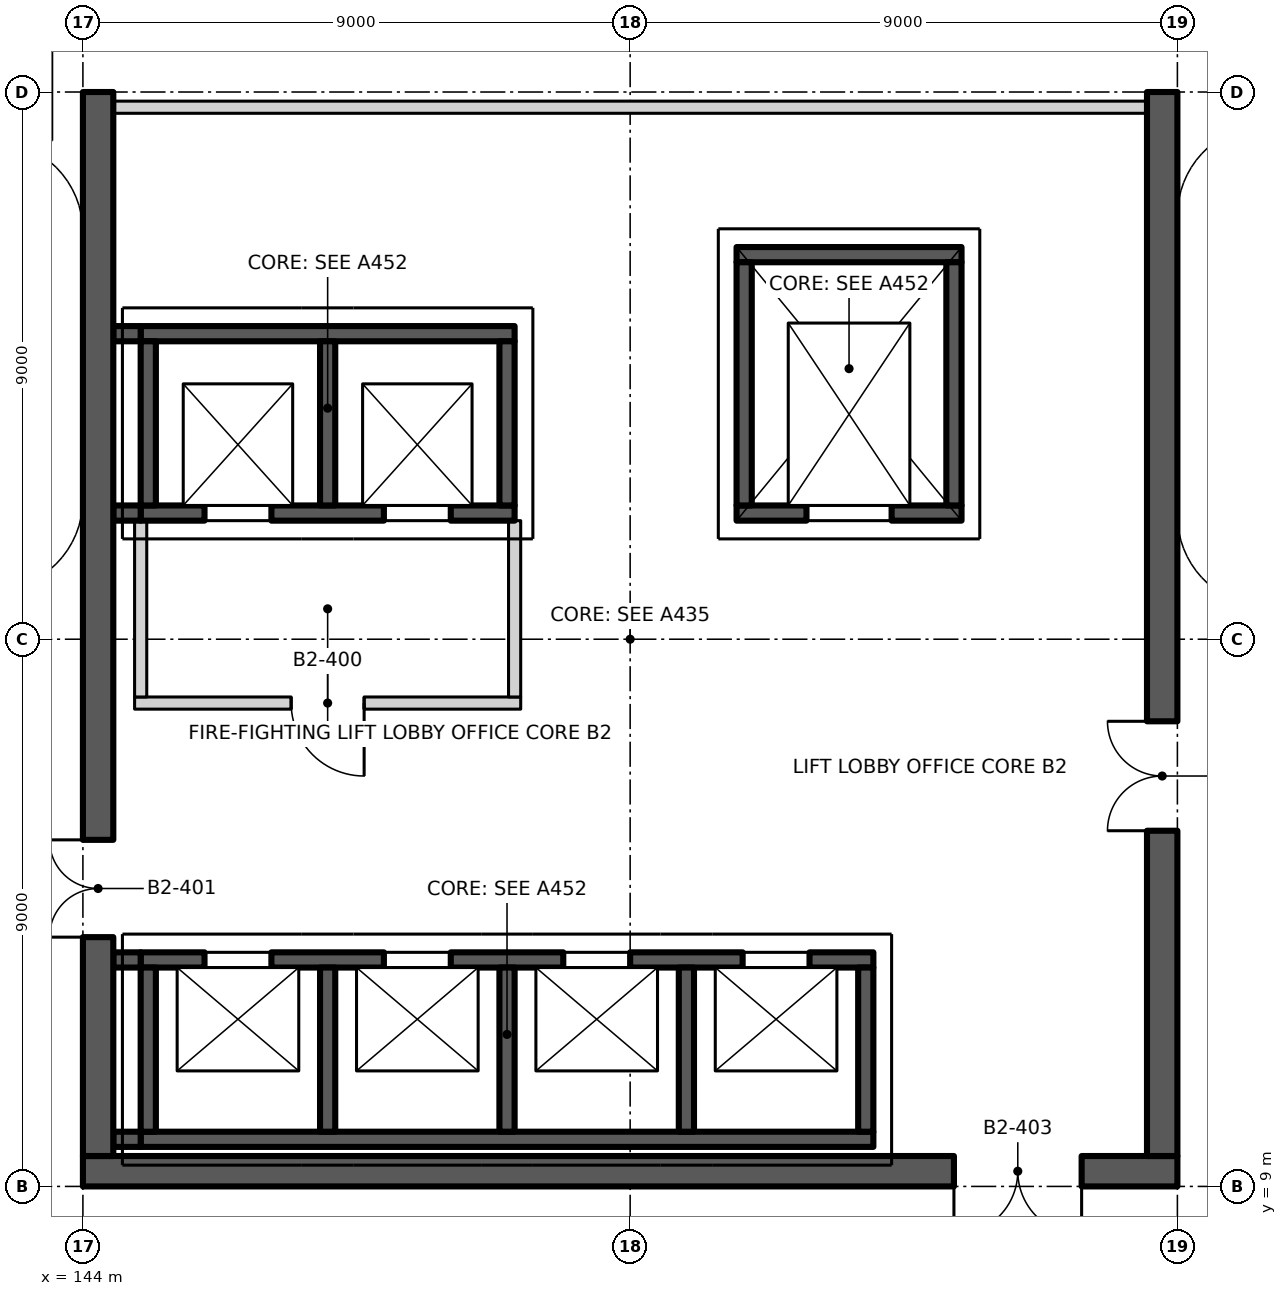
"""IFC4 building model, lengths in metres.
Left out: names, types, materials, properties, quantities, classifications, styles, units other than length and angle.
Written with IfcOpenShell. Run it as: python <this file> out.ifc"""

import sys

from ifc_helpers import new_model, si_unit, direction, frame, frame_2d, origin, place, context, subcontext, project, spatial, rectangle, extrude, element, fill, save


model = new_model("IFC4")
c1 = context("Model", 3, precision=1e-05, world=origin(), true_north=direction((0.0, 1.0)))
c2 = subcontext(c1, "Body", "Model", "MODEL_VIEW")
j1 = project(units=[si_unit("LENGTHUNIT", "METRE"), si_unit("PLANEANGLEUNIT", "RADIAN")], contexts=[c1])
p1 = place(None, origin())
s1 = spatial("IfcSite", under=j1, at=p1, CompositionType="ELEMENT")
p2 = place(p1, origin())
s2 = spatial("IfcBuilding", under=s1, at=p2, CompositionType="ELEMENT")
p3 = place(p2, frame((0.0, 0.0, -9.9)))
s3 = spatial("IfcBuildingStorey", under=s2, at=p3, CompositionType="ELEMENT", Elevation=-9.9)
p4 = place(p3, frame((144.95, 12.725, -1.6), z_axis=(0.0, 0.0, 1.0), x_axis=(1.0, 0.0, 0.0)))
e1 = element("IfcWall", 1, at=p4, inside=s3, PredefinedType="SHEAR", context=c2, shape_type="SweptSolid", body=[
    extrude(rectangle(XDim=12.05, YDim=0.25, at=frame_2d((6.025, 0.0))), origin(), (0.0, 0.0, 1.0), 6.4),
])
p5 = place(p4, frame((1.05, 0.0, 1.6)))
e2 = element("IfcOpeningElement", 2, at=p5, cuts=e1, PredefinedType="OPENING", context=c2, shape_type="SweptSolid", body=[
    extrude(rectangle(XDim=1.1, YDim=2.1, at=frame_2d((0.55, 1.05))), frame((0.0, 0.135, 0.0), z_axis=(0.0, -1.0, 0.0), x_axis=(1.0, 0.0, 0.0)), (0.0, 0.0, 1.0), 0.27),
])
p6 = place(p4, frame((4.0, 0.0, 1.6)))
e3 = element("IfcOpeningElement", 3, at=p6, cuts=e1, PredefinedType="OPENING", context=c2, shape_type="SweptSolid", body=[
    extrude(rectangle(XDim=1.1, YDim=2.1, at=frame_2d((0.55, 1.05))), frame((0.0, 0.135, 0.0), z_axis=(0.0, -1.0, 0.0), x_axis=(1.0, 0.0, 0.0)), (0.0, 0.0, 1.0), 0.27),
])
p7 = place(p4, frame((6.95, 0.0, 1.6)))
e4 = element("IfcOpeningElement", 4, at=p7, cuts=e1, PredefinedType="OPENING", context=c2, shape_type="SweptSolid", body=[
    extrude(rectangle(XDim=1.1, YDim=2.1, at=frame_2d((0.55, 1.05))), frame((0.0, 0.135, 0.0), z_axis=(0.0, -1.0, 0.0), x_axis=(1.0, 0.0, 0.0)), (0.0, 0.0, 1.0), 0.27),
])
p8 = place(p4, frame((9.9, 0.0, 1.6)))
e5 = element("IfcOpeningElement", 5, at=p8, cuts=e1, PredefinedType="OPENING", context=c2, shape_type="SweptSolid", body=[
    extrude(rectangle(XDim=1.1, YDim=2.1, at=frame_2d((0.55, 1.05))), frame((0.0, 0.135, 0.0), z_axis=(0.0, -1.0, 0.0), x_axis=(1.0, 0.0, 0.0)), (0.0, 0.0, 1.0), 0.27),
])
p9 = place(p3, frame((144.95, 9.775, -1.6), z_axis=(0.0, 0.0, 1.0), x_axis=(1.0, 0.0, 0.0)))
e6 = element("IfcWall", 6, at=p9, inside=s3, PredefinedType="SHEAR", context=c2, shape_type="SweptSolid", body=[
    extrude(rectangle(XDim=12.05, YDim=0.25, at=frame_2d((6.025, 0.0))), origin(), (0.0, 0.0, 1.0), 6.4),
])
for number, where, z_axis, x_axis in (
    (7, (144.5, 12.725, 0.0), (0.0, 0.0, 1.0), (1.0, 0.0, 0.0)),
    (8, (144.5, 9.775, 0.0), (0.0, 0.0, 1.0), (1.0, 0.0, 0.0)),
):
    element("IfcWall", number, at=place(p3, frame(where, z_axis=z_axis, x_axis=x_axis)), inside=s3, PredefinedType="SHEAR", context=c2, shape_type="SweptSolid", body=[
        extrude(rectangle(XDim=0.45, YDim=0.25, at=frame_2d((0.225, 0.0))), origin(), (0.0, 0.0, 1.0), 4.8),
    ])
for number, where, z_axis, x_axis in (
    (9, (145.075, 9.9, -1.6), (0.0, 0.0, 1.0), (0.0, 1.0, 0.0)),
    (10, (148.025, 9.9, -1.6), (0.0, 0.0, 1.0), (0.0, 1.0, 0.0)),
    (11, (150.975, 9.9, -1.6), (0.0, 0.0, 1.0), (0.0, 1.0, 0.0)),
    (12, (153.925, 9.9, -1.6), (0.0, 0.0, 1.0), (0.0, 1.0, 0.0)),
    (13, (156.875, 9.9, -1.6), (0.0, 0.0, 1.0), (0.0, 1.0, 0.0)),
):
    element("IfcWall", number, at=place(p3, frame(where, z_axis=z_axis, x_axis=x_axis)), inside=s3, PredefinedType="SHEAR", context=c2, shape_type="SweptSolid", body=[
        extrude(rectangle(XDim=2.7, YDim=0.25, at=frame_2d((1.35, 0.0))), origin(), (0.0, 0.0, 1.0), 6.4),
    ])
p10 = place(p3, frame((144.95, 20.075, -1.6), z_axis=(0.0, 0.0, 1.0), x_axis=(1.0, 0.0, 0.0)))
e14 = element("IfcWall", 14, at=p10, inside=s3, PredefinedType="SHEAR", context=c2, shape_type="SweptSolid", body=[
    extrude(rectangle(XDim=6.15, YDim=0.25, at=frame_2d((3.075, 0.0))), origin(), (0.0, 0.0, 1.0), 6.4),
])
p11 = place(p10, frame((1.05, 0.0, 1.6)))
e15 = element("IfcOpeningElement", 15, at=p11, cuts=e14, PredefinedType="OPENING", context=c2, shape_type="SweptSolid", body=[
    extrude(rectangle(XDim=1.1, YDim=2.1, at=frame_2d((0.55, 1.05))), frame((0.0, 0.135, 0.0), z_axis=(0.0, -1.0, 0.0), x_axis=(1.0, 0.0, 0.0)), (0.0, 0.0, 1.0), 0.27),
])
p12 = place(p10, frame((4.0, 0.0, 1.6)))
e16 = element("IfcOpeningElement", 16, at=p12, cuts=e14, PredefinedType="OPENING", context=c2, shape_type="SweptSolid", body=[
    extrude(rectangle(XDim=1.1, YDim=2.1, at=frame_2d((0.55, 1.05))), frame((0.0, 0.135, 0.0), z_axis=(0.0, -1.0, 0.0), x_axis=(1.0, 0.0, 0.0)), (0.0, 0.0, 1.0), 0.27),
])
p13 = place(p3, frame((144.95, 23.025, -1.6), z_axis=(0.0, 0.0, 1.0), x_axis=(1.0, 0.0, 0.0)))
e17 = element("IfcWall", 17, at=p13, inside=s3, PredefinedType="SHEAR", context=c2, shape_type="SweptSolid", body=[
    extrude(rectangle(XDim=6.15, YDim=0.25, at=frame_2d((3.075, 0.0))), origin(), (0.0, 0.0, 1.0), 6.4),
])
for number, where, z_axis, x_axis in (
    (18, (144.5, 20.075, 0.0), (0.0, 0.0, 1.0), (1.0, 0.0, 0.0)),
    (19, (144.5, 23.025, 0.0), (0.0, 0.0, 1.0), (1.0, 0.0, 0.0)),
):
    element("IfcWall", number, at=place(p3, frame(where, z_axis=z_axis, x_axis=x_axis)), inside=s3, PredefinedType="SHEAR", context=c2, shape_type="SweptSolid", body=[
        extrude(rectangle(XDim=0.45, YDim=0.25, at=frame_2d((0.225, 0.0))), origin(), (0.0, 0.0, 1.0), 4.8),
    ])
for number, where, z_axis, x_axis in (
    (20, (145.075, 20.2, -1.6), (0.0, 0.0, 1.0), (0.0, 1.0, 0.0)),
    (21, (148.025, 20.2, -1.6), (0.0, 0.0, 1.0), (0.0, 1.0, 0.0)),
    (22, (150.975, 20.2, -1.6), (0.0, 0.0, 1.0), (0.0, 1.0, 0.0)),
):
    element("IfcWall", number, at=place(p3, frame(where, z_axis=z_axis, x_axis=x_axis)), inside=s3, PredefinedType="SHEAR", context=c2, shape_type="SweptSolid", body=[
        extrude(rectangle(XDim=2.7, YDim=0.25, at=frame_2d((1.35, 0.0))), origin(), (0.0, 0.0, 1.0), 6.4),
    ])
p14 = place(p3, frame((154.75, 20.075, -1.6), z_axis=(0.0, 0.0, 1.0), x_axis=(1.0, 0.0, 0.0)))
e23 = element("IfcWall", 23, at=p14, inside=s3, PredefinedType="SHEAR", context=c2, shape_type="SweptSolid", body=[
    extrude(rectangle(XDim=3.7, YDim=0.25, at=frame_2d((1.85, 0.0))), origin(), (0.0, 0.0, 1.0), 6.4),
])
p15 = place(p14, frame((1.15, 0.0, 1.6)))
e24 = element("IfcOpeningElement", 24, at=p15, cuts=e23, PredefinedType="OPENING", context=c2, shape_type="SweptSolid", body=[
    extrude(rectangle(XDim=1.4, YDim=2.1, at=frame_2d((0.7, 1.05))), frame((0.0, 0.135, 0.0), z_axis=(0.0, -1.0, 0.0), x_axis=(1.0, 0.0, 0.0)), (0.0, 0.0, 1.0), 0.27),
])
p16 = place(p3, frame((154.75, 24.325, -1.6), z_axis=(0.0, 0.0, 1.0), x_axis=(1.0, 0.0, 0.0)))
e25 = element("IfcWall", 25, at=p16, inside=s3, PredefinedType="SHEAR", context=c2, shape_type="SweptSolid", body=[
    extrude(rectangle(XDim=3.7, YDim=0.25, at=frame_2d((1.85, 0.0))), origin(), (0.0, 0.0, 1.0), 6.4),
])
for number, where, z_axis, x_axis in (
    (26, (154.875, 20.2, -1.6), (0.0, 0.0, 1.0), (0.0, 1.0, 0.0)),
    (27, (158.325, 20.2, -1.6), (0.0, 0.0, 1.0), (0.0, 1.0, 0.0)),
):
    element("IfcWall", number, at=place(p3, frame(where, z_axis=z_axis, x_axis=x_axis)), inside=s3, PredefinedType="SHEAR", context=c2, shape_type="SweptSolid", body=[
        extrude(rectangle(XDim=4.0, YDim=0.25, at=frame_2d((2.0, 0.0))), origin(), (0.0, 0.0, 1.0), 6.4),
    ])
p17 = place(p3, frame((144.0, 9.25, 0.0), z_axis=(0.0, 0.0, 1.0), x_axis=(1.0, 0.0, 0.0)))
e28 = element("IfcWall", 28, at=p17, inside=s3, PredefinedType="SHEAR", context=c2, shape_type="SweptSolid", body=[
    extrude(rectangle(XDim=18.0, YDim=0.5, at=frame_2d((9.0, 0.0))), origin(), (0.0, 0.0, 1.0), 4.5),
])
p18 = place(p17, frame((16.425, 0.0, 0.0), z_axis=(0.0, 0.0, 1.0), x_axis=(-1.0, 0.0, 0.0)))
e29 = element("IfcOpeningElement", 29, at=p18, cuts=e28, PredefinedType="OPENING", context=c2, shape_type="SweptSolid", body=[
    extrude(rectangle(XDim=2.1, YDim=2.4, at=frame_2d((1.05, 1.2))), frame((0.0, 0.26, 0.0), z_axis=(0.0, -1.0, 0.0), x_axis=(1.0, 0.0, 0.0)), (0.0, 0.0, 1.0), 0.52),
])
p19 = place(p3, frame((144.85, 16.95, 0.0), z_axis=(0.0, 0.0, 1.0), x_axis=(1.0, 0.0, 0.0)))
e30 = element("IfcWall", 30, at=p19, inside=s3, PredefinedType="PARTITIONING", context=c2, shape_type="SweptSolid", body=[
    extrude(rectangle(XDim=6.35, YDim=0.2, at=frame_2d((3.175, 0.0))), origin(), (0.0, 0.0, 1.0), 4.5),
])
p20 = place(p19, frame((3.775, 0.0, 0.0), z_axis=(0.0, 0.0, 1.0), x_axis=(-1.0, 0.0, 0.0)))
e31 = element("IfcOpeningElement", 31, at=p20, cuts=e30, PredefinedType="OPENING", context=c2, shape_type="SweptSolid", body=[
    extrude(rectangle(XDim=1.2, YDim=2.1, at=frame_2d((0.6, 1.05))), frame((0.0, 0.11, 0.0), z_axis=(0.0, -1.0, 0.0), x_axis=(1.0, 0.0, 0.0)), (0.0, 0.0, 1.0), 0.22),
])
p21 = place(p3, frame((144.5, 26.75, 0.0), z_axis=(0.0, 0.0, 1.0), x_axis=(1.0, 0.0, 0.0)))
e32 = element("IfcWall", 32, at=p21, inside=s3, PredefinedType="PARTITIONING", context=c2, shape_type="SweptSolid", body=[
    extrude(rectangle(XDim=17.0, YDim=0.2, at=frame_2d((8.5, 0.0))), origin(), (0.0, 0.0, 1.0), 4.5),
])
p22 = place(p3, frame((144.25, 9.5, 0.0), z_axis=(0.0, 0.0, 1.0), x_axis=(0.0, 1.0, 0.0)))
e33 = element("IfcWall", 33, at=p22, inside=s3, PredefinedType="SHEAR", context=c2, shape_type="SweptSolid", body=[
    extrude(rectangle(XDim=17.5, YDim=0.5, at=frame_2d((8.75, 0.0))), origin(), (0.0, 0.0, 1.0), 4.5),
])
p23 = place(p22, frame((3.6, 0.0, 0.0)))
e34 = element("IfcOpeningElement", 34, at=p23, cuts=e33, PredefinedType="OPENING", context=c2, shape_type="SweptSolid", body=[
    extrude(rectangle(XDim=1.6, YDim=2.4, at=frame_2d((0.8, 1.2))), frame((0.0, 0.26, 0.0), z_axis=(0.0, -1.0, 0.0), x_axis=(1.0, 0.0, 0.0)), (0.0, 0.0, 1.0), 0.52),
])
for number, where, z_axis, x_axis in (
    (35, (144.95, 17.05, 0.0), (0.0, 0.0, 1.0), (0.0, 1.0, 0.0)),
    (36, (151.1, 17.05, 0.0), (0.0, 0.0, 1.0), (0.0, 1.0, 0.0)),
):
    element("IfcWall", number, at=place(p3, frame(where, z_axis=z_axis, x_axis=x_axis)), inside=s3, PredefinedType="PARTITIONING", context=c2, shape_type="SweptSolid", body=[
        extrude(rectangle(XDim=2.9, YDim=0.2, at=frame_2d((1.45, 0.0))), origin(), (0.0, 0.0, 1.0), 4.5),
    ])
p24 = place(p3, frame((161.75, 9.5, 0.0), z_axis=(0.0, 0.0, 1.0), x_axis=(0.0, 1.0, 0.0)))
e37 = element("IfcWall", 37, at=p24, inside=s3, PredefinedType="SHEAR", context=c2, shape_type="SweptSolid", body=[
    extrude(rectangle(XDim=17.5, YDim=0.5, at=frame_2d((8.75, 0.0))), origin(), (0.0, 0.0, 1.0), 4.5),
])
p25 = place(p24, frame((5.35, 0.0, 0.0)))
e38 = element("IfcOpeningElement", 38, at=p25, cuts=e37, PredefinedType="OPENING", context=c2, shape_type="SweptSolid", body=[
    extrude(rectangle(XDim=1.8, YDim=2.4, at=frame_2d((0.9, 1.2))), frame((0.0, 0.26, 0.0), z_axis=(0.0, -1.0, 0.0), x_axis=(1.0, 0.0, 0.0)), (0.0, 0.0, 1.0), 0.52),
])
p26 = place(p11, origin())
e39 = element("IfcDoor", 39, at=p26, inside=s3, OperationType="DOUBLE_DOOR_SLIDING", PredefinedType="DOOR", context=c2, shape_type="SweptSolid", body=[
    extrude(rectangle(XDim=1.1, YDim=2.1, at=frame_2d((0.55, 1.05))), frame((0.0, 0.025, 0.0), z_axis=(0.0, -1.0, 0.0), x_axis=(1.0, 0.0, 0.0)), (0.0, 0.0, 1.0), 0.05),
])
fill(e15, e39)
p27 = place(p12, origin())
e40 = element("IfcDoor", 40, at=p27, inside=s3, OperationType="DOUBLE_DOOR_SLIDING", PredefinedType="DOOR", context=c2, shape_type="SweptSolid", body=[
    extrude(rectangle(XDim=1.1, YDim=2.1, at=frame_2d((0.55, 1.05))), frame((0.0, 0.025, 0.0), z_axis=(0.0, -1.0, 0.0), x_axis=(1.0, 0.0, 0.0)), (0.0, 0.0, 1.0), 0.05),
])
fill(e16, e40)
p28 = place(p5, origin())
e41 = element("IfcDoor", 41, at=p28, inside=s3, OperationType="DOUBLE_DOOR_SLIDING", PredefinedType="DOOR", context=c2, shape_type="SweptSolid", body=[
    extrude(rectangle(XDim=1.1, YDim=2.1, at=frame_2d((0.55, 1.05))), frame((0.0, 0.025, 0.0), z_axis=(0.0, -1.0, 0.0), x_axis=(1.0, 0.0, 0.0)), (0.0, 0.0, 1.0), 0.05),
])
fill(e2, e41)
p29 = place(p6, origin())
e42 = element("IfcDoor", 42, at=p29, inside=s3, OperationType="DOUBLE_DOOR_SLIDING", PredefinedType="DOOR", context=c2, shape_type="SweptSolid", body=[
    extrude(rectangle(XDim=1.1, YDim=2.1, at=frame_2d((0.55, 1.05))), frame((0.0, 0.025, 0.0), z_axis=(0.0, -1.0, 0.0), x_axis=(1.0, 0.0, 0.0)), (0.0, 0.0, 1.0), 0.05),
])
fill(e3, e42)
p30 = place(p7, origin())
e43 = element("IfcDoor", 43, at=p30, inside=s3, OperationType="DOUBLE_DOOR_SLIDING", PredefinedType="DOOR", context=c2, shape_type="SweptSolid", body=[
    extrude(rectangle(XDim=1.1, YDim=2.1, at=frame_2d((0.55, 1.05))), frame((0.0, 0.025, 0.0), z_axis=(0.0, -1.0, 0.0), x_axis=(1.0, 0.0, 0.0)), (0.0, 0.0, 1.0), 0.05),
])
fill(e4, e43)
p31 = place(p8, origin())
e44 = element("IfcDoor", 44, at=p31, inside=s3, OperationType="DOUBLE_DOOR_SLIDING", PredefinedType="DOOR", context=c2, shape_type="SweptSolid", body=[
    extrude(rectangle(XDim=1.1, YDim=2.1, at=frame_2d((0.55, 1.05))), frame((0.0, 0.025, 0.0), z_axis=(0.0, -1.0, 0.0), x_axis=(1.0, 0.0, 0.0)), (0.0, 0.0, 1.0), 0.05),
])
fill(e5, e44)
p32 = place(p15, origin())
e45 = element("IfcDoor", 45, at=p32, inside=s3, OperationType="DOUBLE_DOOR_SLIDING", PredefinedType="DOOR", context=c2, shape_type="SweptSolid", body=[
    extrude(rectangle(XDim=1.4, YDim=2.1, at=frame_2d((0.7, 1.05))), frame((0.0, 0.025, 0.0), z_axis=(0.0, -1.0, 0.0), x_axis=(1.0, 0.0, 0.0)), (0.0, 0.0, 1.0), 0.05),
])
fill(e24, e45)
p33 = place(p20, origin())
e46 = element("IfcDoor", 46, at=p33, inside=s3, OperationType="SINGLE_SWING_LEFT", PredefinedType="DOOR", context=c2, shape_type="SweptSolid", body=[
    extrude(rectangle(XDim=1.2, YDim=2.1, at=frame_2d((0.6, 1.05))), frame((0.0, 0.025, 0.0), z_axis=(0.0, -1.0, 0.0), x_axis=(1.0, 0.0, 0.0)), (0.0, 0.0, 1.0), 0.05),
])
fill(e31, e46)
p34 = place(p23, origin())
e47 = element("IfcDoor", 47, at=p34, inside=s3, OperationType="DOUBLE_DOOR_SINGLE_SWING", PredefinedType="DOOR", context=c2, shape_type="SweptSolid", body=[
    extrude(rectangle(XDim=1.6, YDim=2.4, at=frame_2d((0.8, 1.2))), frame((0.0, 0.025, 0.0), z_axis=(0.0, -1.0, 0.0), x_axis=(1.0, 0.0, 0.0)), (0.0, 0.0, 1.0), 0.05),
])
fill(e34, e47)
p35 = place(p25, origin())
e48 = element("IfcDoor", 48, at=p35, inside=s3, OperationType="DOUBLE_DOOR_SINGLE_SWING", PredefinedType="DOOR", context=c2, shape_type="SweptSolid", body=[
    extrude(rectangle(XDim=1.8, YDim=2.4, at=frame_2d((0.9, 1.2))), frame((0.0, 0.025, 0.0), z_axis=(0.0, -1.0, 0.0), x_axis=(1.0, 0.0, 0.0)), (0.0, 0.0, 1.0), 0.05),
])
fill(e38, e48)
p36 = place(p18, origin())
e49 = element("IfcDoor", 49, at=p36, inside=s3, OperationType="DOUBLE_DOOR_SINGLE_SWING", PredefinedType="DOOR", context=c2, shape_type="SweptSolid", body=[
    extrude(rectangle(XDim=2.1, YDim=2.4, at=frame_2d((1.05, 1.2))), frame((0.0, 0.025, 0.0), z_axis=(0.0, -1.0, 0.0), x_axis=(1.0, 0.0, 0.0)), (0.0, 0.0, 1.0), 0.05),
])
fill(e29, e49)
save(model, sys.argv[1])
